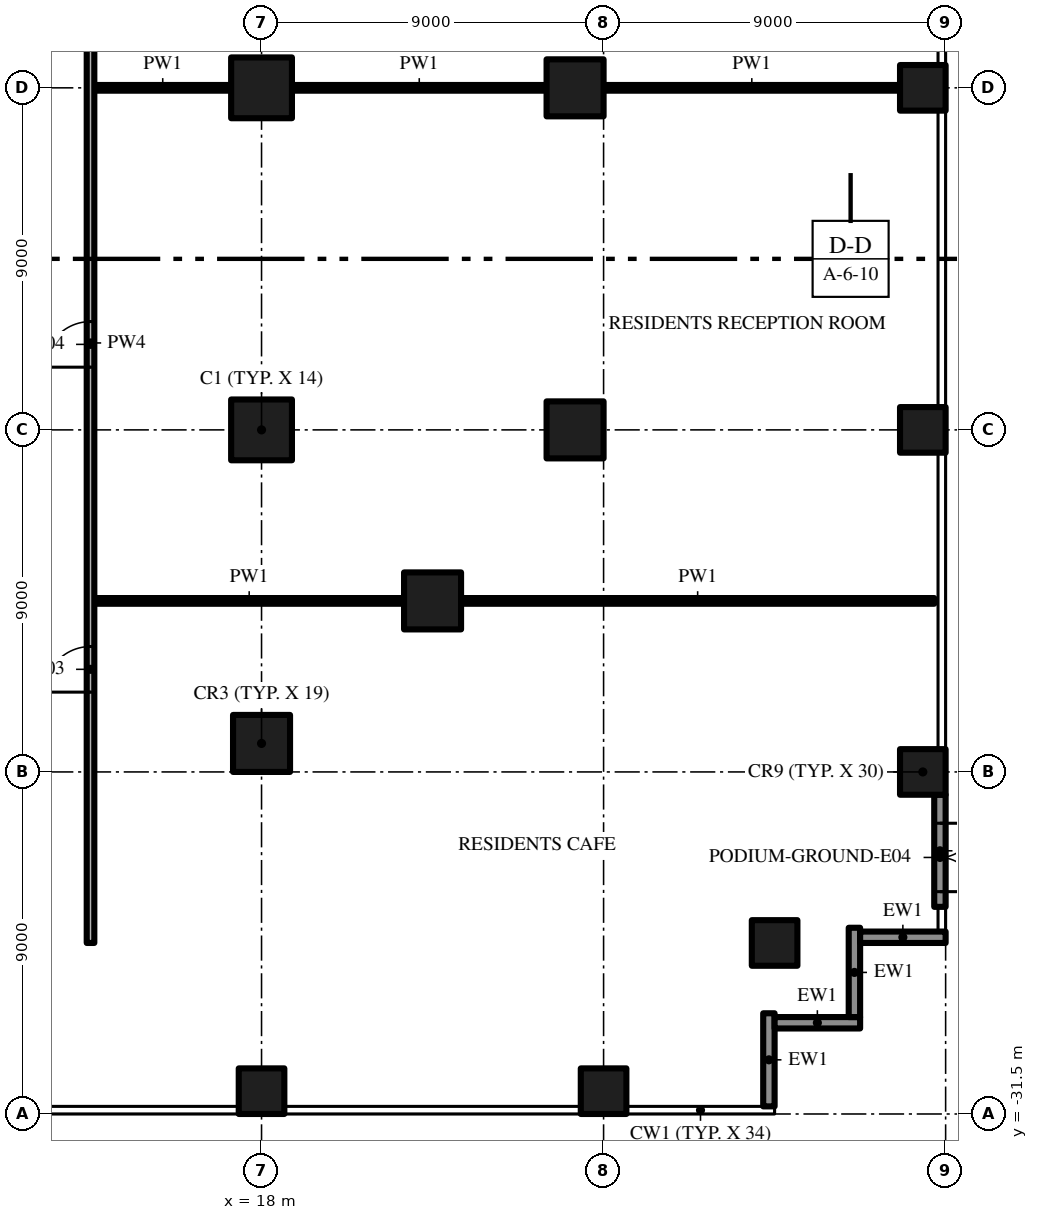
"""IFC4 building model, lengths in metres.
Left out: names, types, materials, properties, quantities, classifications, styles, units other than length and angle.
Written with IfcOpenShell. Run it as: python <this file> out.ifc"""

import sys

from ifc_helpers import new_model, si_unit, direction, frame, frame_2d, origin, origin_2d, place, context, subcontext, project, spatial, rectangle, extrude, element, fill, save


model = new_model("IFC4")
c1 = context("Model", 3, precision=1e-05, world=origin(), true_north=direction((0.0, 1.0)))
c2 = subcontext(c1, "Body", "Model", "MODEL_VIEW")
j1 = project(units=[si_unit("LENGTHUNIT", "METRE"), si_unit("PLANEANGLEUNIT", "RADIAN")], contexts=[c1])
p1 = place(None, origin())
s1 = spatial("IfcSite", under=j1, at=p1, CompositionType="ELEMENT")
p2 = place(p1, origin())
s2 = spatial("IfcBuilding", under=s1, at=p2, CompositionType="ELEMENT")
p3 = place(p2, origin())
s3 = spatial("IfcBuildingStorey", under=s2, at=p3, CompositionType="ELEMENT", Elevation=0.0)
for number, where, z_axis, x_axis in (
    (1, (18.0, -30.9, 0.0), (0.0, 0.0, 1.0), (1.0, 0.0, 0.0)),
    (2, (27.0, -30.9, 0.0), (0.0, 0.0, 1.0), (1.0, 0.0, 0.0)),
    (3, (35.4, -13.5, 0.0), (0.0, 0.0, 1.0), (1.0, 0.0, 0.0)),
    (4, (35.4, -22.5, 0.0), (0.0, 0.0, 1.0), (1.0, 0.0, 0.0)),
    (5, (31.5, -27.0, 0.0), (0.0, 0.0, 1.0), (1.0, 0.0, 0.0)),
    (6, (35.4, -4.5, 0.0), (0.0, 0.0, 1.0), (1.0, 0.0, 0.0)),
):
    element("IfcColumn", number, at=place(p3, frame(where, z_axis=z_axis, x_axis=x_axis)), inside=s3, PredefinedType="COLUMN", context=c2, shape_type="SweptSolid", body=[
        extrude(rectangle(XDim=1.2, YDim=1.2, at=origin_2d()), origin(), (0.0, 0.0, 1.0), 5.6),
    ])
p4 = place(p3, frame((18.0, -13.5, 0.0), z_axis=(0.0, 0.0, 1.0), x_axis=(1.0, 0.0, 0.0)))
e7 = element("IfcColumn", 7, at=p4, inside=s3, PredefinedType="COLUMN", context=c2, shape_type="SweptSolid", body=[
    extrude(rectangle(XDim=1.6, YDim=1.6, at=origin_2d()), origin(), (0.0, 0.0, 1.0), 5.6),
])
p5 = place(p3, frame((18.0, -21.75, 0.0), z_axis=(0.0, 0.0, 1.0), x_axis=(1.0, 0.0, 0.0)))
e8 = element("IfcColumn", 8, at=p5, inside=s3, PredefinedType="COLUMN", context=c2, shape_type="SweptSolid", body=[
    extrude(rectangle(XDim=1.5, YDim=1.5, at=origin_2d()), origin(), (0.0, 0.0, 1.0), 5.6),
])
p6 = place(p3, frame((18.0, -4.5, 0.0), z_axis=(0.0, 0.0, 1.0), x_axis=(1.0, 0.0, 0.0)))
e9 = element("IfcColumn", 9, at=p6, inside=s3, PredefinedType="COLUMN", context=c2, shape_type="SweptSolid", body=[
    extrude(rectangle(XDim=1.6, YDim=1.6, at=origin_2d()), origin(), (0.0, 0.0, 1.0), 5.6),
])
for number, where, z_axis, x_axis in (
    (10, (26.25, -13.5, 0.0), (0.0, 0.0, 1.0), (1.0, 0.0, 0.0)),
    (11, (22.5, -18.0, 0.0), (0.0, 0.0, 1.0), (1.0, 0.0, 0.0)),
    (12, (26.25, -4.5, 0.0), (0.0, 0.0, 1.0), (1.0, 0.0, 0.0)),
):
    element("IfcColumn", number, at=place(p3, frame(where, z_axis=z_axis, x_axis=x_axis)), inside=s3, PredefinedType="COLUMN", context=c2, shape_type="SweptSolid", body=[
        extrude(rectangle(XDim=1.5, YDim=1.5, at=origin_2d()), origin(), (0.0, 0.0, 1.0), 5.6),
    ])
p7 = place(p3, frame((31.35, -28.85, 0.0), z_axis=(0.0, 0.0, 1.0), x_axis=(0.0, -1.0, 0.0)))
e13 = element("IfcWall", 13, at=p7, inside=s3, PredefinedType="SOLIDWALL", context=c2, shape_type="SweptSolid", body=[
    extrude(rectangle(XDim=2.45, YDim=0.3, at=frame_2d((1.225, 0.0))), origin(), (0.0, 0.0, 1.0), 5.6),
])
p8 = place(p3, frame((33.75, -29.1, 0.0), z_axis=(0.0, 0.0, 1.0), x_axis=(-1.0, 0.0, 0.0)))
e14 = element("IfcWall", 14, at=p8, inside=s3, PredefinedType="SOLIDWALL", context=c2, shape_type="SweptSolid", body=[
    extrude(rectangle(XDim=2.25, YDim=0.3, at=frame_2d((1.125, 0.0))), origin(), (0.0, 0.0, 1.0), 5.6),
])
p9 = place(p3, frame((33.6, -26.6, 0.0), z_axis=(0.0, 0.0, 1.0), x_axis=(0.0, -1.0, 0.0)))
e15 = element("IfcWall", 15, at=p9, inside=s3, PredefinedType="SOLIDWALL", context=c2, shape_type="SweptSolid", body=[
    extrude(rectangle(XDim=2.35, YDim=0.3, at=frame_2d((1.175, 0.0))), origin(), (0.0, 0.0, 1.0), 5.6),
])
p10 = place(p3, frame((36.0, -26.85, 0.0), z_axis=(0.0, 0.0, 1.0), x_axis=(-1.0, 0.0, 0.0)))
e16 = element("IfcWall", 16, at=p10, inside=s3, PredefinedType="SOLIDWALL", context=c2, shape_type="SweptSolid", body=[
    extrude(rectangle(XDim=2.25, YDim=0.3, at=frame_2d((1.125, 0.0))), origin(), (0.0, 0.0, 1.0), 5.6),
])
p11 = place(p3, frame((35.85, -23.1, 0.0), z_axis=(0.0, 0.0, 1.0), x_axis=(0.0, -1.0, 0.0)))
e17 = element("IfcWall", 17, at=p11, inside=s3, PredefinedType="SOLIDWALL", context=c2, shape_type="SweptSolid", body=[
    extrude(rectangle(XDim=2.95, YDim=0.3, at=frame_2d((1.475, 0.0))), origin(), (0.0, 0.0, 1.0), 5.6),
])
p12 = place(p11, frame((0.75, 0.0, 0.0)))
e18 = element("IfcOpeningElement", 18, at=p12, cuts=e17, PredefinedType="OPENING", context=c2, shape_type="SweptSolid", body=[
    extrude(rectangle(XDim=1.8, YDim=2.7, at=frame_2d((0.9, 1.35))), frame((0.0, 0.16, 0.0), z_axis=(0.0, -1.0, 0.0), x_axis=(1.0, 0.0, 0.0)), (0.0, 0.0, 1.0), 0.32),
])
p13 = place(p3, frame((13.6, -18.0, 0.0), z_axis=(0.0, 0.0, 1.0), x_axis=(1.0, 0.0, 0.0)))
e19 = element("IfcWall", 19, at=p13, inside=s3, PredefinedType="PARTITIONING", context=c2, shape_type="SweptSolid", body=[
    extrude(rectangle(XDim=8.15, YDim=0.15, at=frame_2d((4.075, 0.0))), origin(), (0.0, 0.0, 1.0), 5.6),
])
p14 = place(p3, frame((23.25, -18.0, 0.0), z_axis=(0.0, 0.0, 1.0), x_axis=(1.0, 0.0, 0.0)))
e20 = element("IfcWall", 20, at=p14, inside=s3, PredefinedType="PARTITIONING", context=c2, shape_type="SweptSolid", body=[
    extrude(rectangle(XDim=12.45, YDim=0.15, at=frame_2d((6.225, 0.0))), origin(), (0.0, 0.0, 1.0), 5.6),
])
p15 = place(p3, frame((13.6, -4.5, 0.0), z_axis=(0.0, 0.0, 1.0), x_axis=(1.0, 0.0, 0.0)))
e21 = element("IfcWall", 21, at=p15, inside=s3, PredefinedType="PARTITIONING", context=c2, shape_type="SweptSolid", body=[
    extrude(rectangle(XDim=3.6, YDim=0.15, at=frame_2d((1.8, 0.0))), origin(), (0.0, 0.0, 1.0), 5.6),
])
p16 = place(p3, frame((18.8, -4.5, 0.0), z_axis=(0.0, 0.0, 1.0), x_axis=(1.0, 0.0, 0.0)))
e22 = element("IfcWall", 22, at=p16, inside=s3, PredefinedType="PARTITIONING", context=c2, shape_type="SweptSolid", body=[
    extrude(rectangle(XDim=6.7, YDim=0.15, at=frame_2d((3.35, 0.0))), origin(), (0.0, 0.0, 1.0), 5.6),
])
p17 = place(p3, frame((27.0, -4.5, 0.0), z_axis=(0.0, 0.0, 1.0), x_axis=(1.0, 0.0, 0.0)))
e23 = element("IfcWall", 23, at=p17, inside=s3, PredefinedType="PARTITIONING", context=c2, shape_type="SweptSolid", body=[
    extrude(rectangle(XDim=7.8, YDim=0.15, at=frame_2d((3.9, 0.0))), origin(), (0.0, 0.0, 1.0), 5.6),
])
p18 = place(p3, frame((13.5, -27.0, 0.0), z_axis=(0.0, 0.0, 1.0), x_axis=(0.0, 1.0, 0.0)))
e24 = element("IfcWall", 24, at=p18, inside=s3, PredefinedType="PARTITIONING", context=c2, shape_type="SweptSolid", body=[
    extrude(rectangle(XDim=31.575, YDim=0.2, at=frame_2d((15.787, 0.0))), origin(), (0.0, 0.0, 1.0), 5.6),
])
p19 = place(p18, frame((6.6, 0.0, 0.0)))
e25 = element("IfcOpeningElement", 25, at=p19, cuts=e24, PredefinedType="OPENING", context=c2, shape_type="SweptSolid", body=[
    extrude(rectangle(XDim=1.2, YDim=2.4, at=frame_2d((0.6, 1.2))), frame((0.0, 0.11, 0.0), z_axis=(0.0, -1.0, 0.0), x_axis=(1.0, 0.0, 0.0)), (0.0, 0.0, 1.0), 0.22),
])
p20 = place(p18, frame((15.15, 0.0, 0.0)))
e26 = element("IfcOpeningElement", 26, at=p20, cuts=e24, PredefinedType="OPENING", context=c2, shape_type="SweptSolid", body=[
    extrude(rectangle(XDim=1.2, YDim=2.4, at=frame_2d((0.6, 1.2))), frame((0.0, 0.11, 0.0), z_axis=(0.0, -1.0, 0.0), x_axis=(1.0, 0.0, 0.0)), (0.0, 0.0, 1.0), 0.22),
])
p21 = place(p18, frame((24.5, 0.0, 0.0)))
e27 = element("IfcOpeningElement", 27, at=p21, cuts=e24, PredefinedType="OPENING", context=c2, shape_type="SweptSolid", body=[
    extrude(rectangle(XDim=1.0, YDim=2.4, at=frame_2d((0.5, 1.2))), frame((0.0, 0.11, 0.0), z_axis=(0.0, -1.0, 0.0), x_axis=(1.0, 0.0, 0.0)), (0.0, 0.0, 1.0), 0.22),
])
p22 = place(p12, origin())
e28 = element("IfcDoor", 28, at=p22, inside=s3, OperationType="SINGLE_SWING_LEFT", PredefinedType="DOOR", context=c2, shape_type="SweptSolid", body=[
    extrude(rectangle(XDim=1.8, YDim=2.7, at=frame_2d((0.9, 1.35))), frame((0.0, 0.025, 0.0), z_axis=(0.0, -1.0, 0.0), x_axis=(1.0, 0.0, 0.0)), (0.0, 0.0, 1.0), 0.05),
])
fill(e18, e28)
p23 = place(p19, origin())
e29 = element("IfcDoor", 29, at=p23, inside=s3, OperationType="SINGLE_SWING_LEFT", PredefinedType="DOOR", context=c2, shape_type="SweptSolid", body=[
    extrude(rectangle(XDim=1.2, YDim=2.4, at=frame_2d((0.6, 1.2))), frame((0.0, 0.025, 0.0), z_axis=(0.0, -1.0, 0.0), x_axis=(1.0, 0.0, 0.0)), (0.0, 0.0, 1.0), 0.05),
])
fill(e25, e29)
p24 = place(p20, origin())
e30 = element("IfcDoor", 30, at=p24, inside=s3, OperationType="SINGLE_SWING_LEFT", PredefinedType="DOOR", context=c2, shape_type="SweptSolid", body=[
    extrude(rectangle(XDim=1.2, YDim=2.4, at=frame_2d((0.6, 1.2))), frame((0.0, 0.025, 0.0), z_axis=(0.0, -1.0, 0.0), x_axis=(1.0, 0.0, 0.0)), (0.0, 0.0, 1.0), 0.05),
])
fill(e26, e30)
save(model, sys.argv[1])
